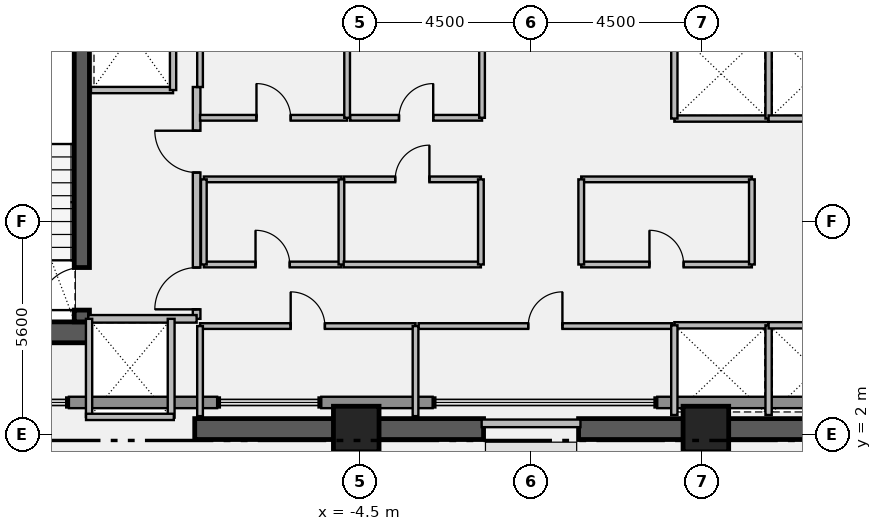
"""IFC4 building model, lengths in metres.
Left out: names, types, materials, properties, quantities, classifications, styles, units other than length and angle.
Written with IfcOpenShell. Run it as: python <this file> out.ifc"""

import sys

from ifc_helpers import new_model, si_unit, direction, frame, frame_2d, origin, origin_2d, place, context, subcontext, project, spatial, rectangle, extrude, element, fill, save


model = new_model("IFC4")
c1 = context("Model", 3, precision=1e-05, world=origin(), true_north=direction((0.0, 1.0)))
c2 = subcontext(c1, "Body", "Model", "MODEL_VIEW")
j1 = project(units=[si_unit("LENGTHUNIT", "METRE"), si_unit("PLANEANGLEUNIT", "RADIAN")], contexts=[c1])
p1 = place(None, origin())
s1 = spatial("IfcSite", under=j1, at=p1, CompositionType="ELEMENT")
p2 = place(p1, origin())
s2 = spatial("IfcBuilding", under=s1, at=p2, CompositionType="ELEMENT")
p3 = place(p2, frame((0.0, 0.0, 297.25)))
s3 = spatial("IfcBuildingStorey", under=s2, at=p3, CompositionType="ELEMENT", Elevation=297.25)
p4 = place(p3, frame((-15.96, 4.695, 0.0), z_axis=(0.0, 0.0, 1.0), x_axis=(1.0, 0.0, 0.0)))
e1 = element("IfcWall", 1, at=p4, inside=s3, PredefinedType="SHEAR", context=c2, shape_type="SweptSolid", body=[
    extrude(rectangle(XDim=4.36, YDim=0.55, at=frame_2d((2.18, 0.0))), origin(), (0.0, 0.0, 1.0), 3.61),
])
for number, where, z_axis, x_axis in (
    (2, (-8.85, 2.15, 0.0), (0.0, 0.0, 1.0), (1.0, 0.0, 0.0)),
    (3, (1.25, 2.15, 0.0), (0.0, 0.0, 1.0), (1.0, 0.0, 0.0)),
):
    element("IfcWall", number, at=place(p3, frame(where, z_axis=z_axis, x_axis=x_axis)), inside=s3, PredefinedType="SHEAR", context=c2, shape_type="SweptSolid", body=[
        extrude(rectangle(XDim=7.6, YDim=0.55, at=frame_2d((3.8, 0.0))), origin(), (0.0, 0.0, 1.0), 3.56),
    ])
p5 = place(p3, frame((-11.82, 4.97, 0.0), z_axis=(0.0, 0.0, 1.0), x_axis=(0.0, 1.0, 0.0)))
e4 = element("IfcWall", 4, at=p5, inside=s3, PredefinedType="SHEAR", context=c2, shape_type="SweptSolid", body=[
    extrude(rectangle(XDim=8.96, YDim=0.4, at=frame_2d((4.48, 0.0))), origin(), (0.0, 0.0, 1.0), 3.61),
])
p6 = place(p5, frame((0.31, 0.0, 0.0)))
e5 = element("IfcOpeningElement", 5, at=p6, cuts=e4, PredefinedType="OPENING", context=c2, shape_type="SweptSolid", body=[
    extrude(rectangle(XDim=1.12, YDim=2.22, at=frame_2d((0.56, 1.11))), frame((0.0, 0.21, 0.0), z_axis=(0.0, -1.0, 0.0), x_axis=(1.0, 0.0, 0.0)), (0.0, 0.0, 1.0), 0.42),
])
for number, where, z_axis, x_axis in (
    (6, (-4.6, 2.15, 0.0), (0.0, 0.0, 1.0), (1.0, 0.0, 0.0)),
    (7, (4.6, 2.15, 0.0), (0.0, 0.0, 1.0), (1.0, 0.0, 0.0)),
):
    element("IfcColumn", number, at=place(p3, frame(where, z_axis=z_axis, x_axis=x_axis)), inside=s3, PredefinedType="COLUMN", context=c2, shape_type="SweptSolid", body=[
        extrude(rectangle(XDim=1.2, YDim=1.2, at=origin_2d()), origin(), (0.0, 0.0, 1.0), 3.8),
    ])
p7 = place(p3, frame((9.18, 2.85, 0.0), z_axis=(0.0, 0.0, 1.0), x_axis=(-1.0, 0.0, 0.0)))
e8 = element("IfcWall", 8, at=p7, inside=s3, PredefinedType="STANDARD", context=c2, shape_type="SweptSolid", body=[
    extrude(rectangle(XDim=5.86, YDim=0.3, at=frame_2d((2.93, 0.0))), origin(), (0.0, 0.0, 1.0), 3.56),
])
p8 = place(p3, frame((-2.59, 2.85, 0.0), z_axis=(0.0, 0.0, 1.0), x_axis=(-1.0, 0.0, 0.0)))
e9 = element("IfcWall", 9, at=p8, inside=s3, PredefinedType="STANDARD", context=c2, shape_type="SweptSolid", body=[
    extrude(rectangle(XDim=2.93, YDim=0.3, at=frame_2d((1.465, 0.0))), origin(), (0.0, 0.0, 1.0), 3.56),
])
p9 = place(p3, frame((-8.26, 2.85, 0.0), z_axis=(0.0, 0.0, 1.0), x_axis=(-1.0, 0.0, 0.0)))
e10 = element("IfcWall", 10, at=p9, inside=s3, PredefinedType="STANDARD", context=c2, shape_type="SweptSolid", body=[
    extrude(rectangle(XDim=3.9, YDim=0.3, at=frame_2d((1.95, 0.0))), origin(), (0.0, 0.0, 1.0), 3.56),
])
p10 = place(p3, frame((-8.8, 5.05, 0.0), z_axis=(0.0, 0.0, 1.0), x_axis=(0.0, 1.0, 0.0)))
e11 = element("IfcWall", 11, at=p10, inside=s3, PredefinedType="PARTITIONING", context=c2, shape_type="SweptSolid", body=[
    extrude(rectangle(XDim=6.1, YDim=0.2, at=frame_2d((3.05, 0.0))), origin(), (0.0, 0.0, 1.0), 3.56),
])
p11 = place(p10, frame((0.25, 0.0, 0.0)))
e12 = element("IfcOpeningElement", 12, at=p11, cuts=e11, PredefinedType="OPENING", context=c2, shape_type="SweptSolid", body=[
    extrude(rectangle(XDim=1.1, YDim=2.2, at=frame_2d((0.55, 1.1))), frame((0.0, 0.11, 0.0), z_axis=(0.0, -1.0, 0.0), x_axis=(1.0, 0.0, 0.0)), (0.0, 0.0, 1.0), 0.22),
])
p12 = place(p10, frame((3.85, 0.0, 0.0)))
e13 = element("IfcOpeningElement", 13, at=p12, cuts=e11, PredefinedType="OPENING", context=c2, shape_type="SweptSolid", body=[
    extrude(rectangle(XDim=1.1, YDim=2.2, at=frame_2d((0.55, 1.1))), frame((0.0, 0.11, 0.0), z_axis=(0.0, -1.0, 0.0), x_axis=(1.0, 0.0, 0.0)), (0.0, 0.0, 1.0), 0.22),
])
p13 = place(p3, frame((-8.71, 4.86, 0.0), z_axis=(0.0, 0.0, 1.0), x_axis=(1.0, 0.0, 0.0)))
e14 = element("IfcWall", 14, at=p13, inside=s3, PredefinedType="PARTITIONING", context=c2, shape_type="SweptSolid", body=[
    extrude(rectangle(XDim=5.67, YDim=0.15, at=frame_2d((2.835, 0.0))), origin(), (0.0, 0.0, 1.0), 3.56),
])
p14 = place(p13, frame((2.385, 0.0, 0.0)))
e15 = element("IfcOpeningElement", 15, at=p14, cuts=e14, PredefinedType="OPENING", context=c2, shape_type="SweptSolid", body=[
    extrude(rectangle(XDim=0.9, YDim=2.15, at=frame_2d((0.45, 1.075))), frame((0.0, 0.085, 0.0), z_axis=(0.0, -1.0, 0.0), x_axis=(1.0, 0.0, 0.0)), (0.0, 0.0, 1.0), 0.17),
])
p15 = place(p3, frame((-2.96, 4.86, 0.0), z_axis=(0.0, 0.0, 1.0), x_axis=(1.0, 0.0, 0.0)))
e16 = element("IfcWall", 16, at=p15, inside=s3, PredefinedType="PARTITIONING", context=c2, shape_type="SweptSolid", body=[
    extrude(rectangle(XDim=6.67, YDim=0.15, at=frame_2d((3.335, 0.0))), origin(), (0.0, 0.0, 1.0), 3.56),
])
p16 = place(p15, frame((2.885, 0.0, 0.0)))
e17 = element("IfcOpeningElement", 17, at=p16, cuts=e16, PredefinedType="OPENING", context=c2, shape_type="SweptSolid", body=[
    extrude(rectangle(XDim=0.9, YDim=2.15, at=frame_2d((0.45, 1.075))), frame((0.0, 0.085, 0.0), z_axis=(0.0, -1.0, 0.0), x_axis=(1.0, 0.0, 0.0)), (0.0, 0.0, 1.0), 0.17),
])
p17 = place(p3, frame((-8.71, 10.34, 0.0), z_axis=(0.0, 0.0, 1.0), x_axis=(1.0, 0.0, 0.0)))
e18 = element("IfcWall", 18, at=p17, inside=s3, PredefinedType="PARTITIONING", context=c2, shape_type="SweptSolid", body=[
    extrude(rectangle(XDim=3.87, YDim=0.15, at=frame_2d((1.935, 0.0))), origin(), (0.0, 0.0, 1.0), 3.56),
])
p18 = place(p17, frame((1.485, 0.0, 0.0)))
e19 = element("IfcOpeningElement", 19, at=p18, cuts=e18, PredefinedType="OPENING", context=c2, shape_type="SweptSolid", body=[
    extrude(rectangle(XDim=0.9, YDim=2.15, at=frame_2d((0.45, 1.075))), frame((0.0, 0.085, 0.0), z_axis=(0.0, -1.0, 0.0), x_axis=(1.0, 0.0, 0.0)), (0.0, 0.0, 1.0), 0.17),
])
p19 = place(p3, frame((-4.76, 10.34, 0.0), z_axis=(0.0, 0.0, 1.0), x_axis=(1.0, 0.0, 0.0)))
e20 = element("IfcWall", 20, at=p19, inside=s3, PredefinedType="PARTITIONING", context=c2, shape_type="SweptSolid", body=[
    extrude(rectangle(XDim=3.47, YDim=0.15, at=frame_2d((1.735, 0.0))), origin(), (0.0, 0.0, 1.0), 3.56),
])
p20 = place(p19, frame((1.285, 0.0, 0.0)))
e21 = element("IfcOpeningElement", 21, at=p20, cuts=e20, PredefinedType="OPENING", context=c2, shape_type="SweptSolid", body=[
    extrude(rectangle(XDim=0.9, YDim=2.15, at=frame_2d((0.45, 1.075))), frame((0.0, 0.085, 0.0), z_axis=(0.0, -1.0, 0.0), x_axis=(1.0, 0.0, 0.0)), (0.0, 0.0, 1.0), 0.17),
])
p21 = place(p3, frame((-8.61, 6.48, 0.0), z_axis=(0.0, 0.0, 1.0), x_axis=(1.0, 0.0, 0.0)))
e22 = element("IfcWall", 22, at=p21, inside=s3, PredefinedType="PARTITIONING", context=c2, shape_type="SweptSolid", body=[
    extrude(rectangle(XDim=3.62, YDim=0.15, at=frame_2d((1.81, 0.0))), origin(), (0.0, 0.0, 1.0), 3.56),
])
p22 = place(p21, frame((1.36, 0.0, 0.0)))
e23 = element("IfcOpeningElement", 23, at=p22, cuts=e22, PredefinedType="OPENING", context=c2, shape_type="SweptSolid", body=[
    extrude(rectangle(XDim=0.9, YDim=2.15, at=frame_2d((0.45, 1.075))), frame((0.0, 0.085, 0.0), z_axis=(0.0, -1.0, 0.0), x_axis=(1.0, 0.0, 0.0)), (0.0, 0.0, 1.0), 0.17),
])
p23 = place(p3, frame((-4.93, 8.72, 0.0), z_axis=(0.0, 0.0, 1.0), x_axis=(1.0, 0.0, 0.0)))
e24 = element("IfcWall", 24, at=p23, inside=s3, PredefinedType="PARTITIONING", context=c2, shape_type="SweptSolid", body=[
    extrude(rectangle(XDim=3.61, YDim=0.15, at=frame_2d((1.805, 0.0))), origin(), (0.0, 0.0, 1.0), 3.56),
])
p24 = place(p23, frame((1.355, 0.0, 0.0)))
e25 = element("IfcOpeningElement", 25, at=p24, cuts=e24, PredefinedType="OPENING", context=c2, shape_type="SweptSolid", body=[
    extrude(rectangle(XDim=0.9, YDim=2.15, at=frame_2d((0.45, 1.075))), frame((0.0, 0.085, 0.0), z_axis=(0.0, -1.0, 0.0), x_axis=(1.0, 0.0, 0.0)), (0.0, 0.0, 1.0), 0.17),
])
p25 = place(p3, frame((1.32, 6.48, 0.0), z_axis=(0.0, 0.0, 1.0), x_axis=(1.0, 0.0, 0.0)))
e26 = element("IfcWall", 26, at=p25, inside=s3, PredefinedType="PARTITIONING", context=c2, shape_type="SweptSolid", body=[
    extrude(rectangle(XDim=4.49, YDim=0.15, at=frame_2d((2.245, 0.0))), origin(), (0.0, 0.0, 1.0), 3.56),
])
p26 = place(p25, frame((1.795, 0.0, 0.0)))
e27 = element("IfcOpeningElement", 27, at=p26, cuts=e26, PredefinedType="OPENING", context=c2, shape_type="SweptSolid", body=[
    extrude(rectangle(XDim=0.9, YDim=2.15, at=frame_2d((0.45, 1.075))), frame((0.0, 0.085, 0.0), z_axis=(0.0, -1.0, 0.0), x_axis=(1.0, 0.0, 0.0)), (0.0, 0.0, 1.0), 0.17),
])
p27 = place(p3, frame((-11.65, 5.05, 0.0), z_axis=(0.0, 0.0, 1.0), x_axis=(1.0, 0.0, 0.0)))
e28 = element("IfcWall", 28, at=p27, inside=s3, PredefinedType="PARTITIONING", context=c2, shape_type="SweptSolid", body=[
    extrude(rectangle(XDim=2.85, YDim=0.2, at=frame_2d((1.425, 0.0))), origin(), (0.0, 0.0, 1.0), 3.56),
])
p28 = place(p3, frame((-11.58, 11.07, 0.0), z_axis=(0.0, 0.0, 1.0), x_axis=(1.0, 0.0, 0.0)))
e29 = element("IfcWall", 29, at=p28, inside=s3, PredefinedType="PARTITIONING", context=c2, shape_type="SweptSolid", body=[
    extrude(rectangle(XDim=2.16, YDim=0.165, at=frame_2d((1.08, 0.0))), origin(), (0.0, 0.0, 1.0), 3.56),
])
p29 = place(p3, frame((-9.42, 11.07, 0.0), z_axis=(0.0, 0.0, 1.0), x_axis=(0.0, 1.0, 0.0)))
e30 = element("IfcWall", 30, at=p29, inside=s3, PredefinedType="PARTITIONING", context=c2, shape_type="SweptSolid", body=[
    extrude(rectangle(XDim=2.96, YDim=0.165, at=frame_2d((1.48, 0.0))), origin(), (0.0, 0.0, 1.0), 3.56),
])
p30 = place(p3, frame((3.77, 4.88, 0.0), z_axis=(0.0, 0.0, 1.0), x_axis=(1.0, 0.0, 0.0)))
e31 = element("IfcWall", 31, at=p30, inside=s3, PredefinedType="PARTITIONING", context=c2, shape_type="SweptSolid", body=[
    extrude(rectangle(XDim=2.48, YDim=0.165, at=frame_2d((1.24, 0.0))), origin(), (0.0, 0.0, 1.0), 3.56),
])
for number, where, z_axis, x_axis in (
    (32, (3.77, 2.52, 0.0), (0.0, 0.0, 1.0), (0.0, 1.0, 0.0)),
    (33, (6.25, 2.52, 0.0), (0.0, 0.0, 1.0), (0.0, 1.0, 0.0)),
):
    element("IfcWall", number, at=place(p3, frame(where, z_axis=z_axis, x_axis=x_axis)), inside=s3, PredefinedType="PARTITIONING", context=c2, shape_type="SweptSolid", body=[
        extrude(rectangle(XDim=2.36, YDim=0.165, at=frame_2d((1.18, 0.0))), origin(), (0.0, 0.0, 1.0), 3.56),
    ])
for number, where, z_axis, x_axis in (
    (34, (6.25, 4.88, 0.0), (0.0, 0.0, 1.0), (1.0, 0.0, 0.0)),
    (35, (3.77, 10.32, 0.0), (0.0, 0.0, 1.0), (1.0, 0.0, 0.0)),
):
    element("IfcWall", number, at=place(p3, frame(where, z_axis=z_axis, x_axis=x_axis)), inside=s3, PredefinedType="PARTITIONING", context=c2, shape_type="SweptSolid", body=[
        extrude(rectangle(XDim=2.48, YDim=0.165, at=frame_2d((1.24, 0.0))), origin(), (0.0, 0.0, 1.0), 3.56),
    ])
for number, where, z_axis, x_axis in (
    (36, (3.77, 10.32, 0.0), (0.0, 0.0, 1.0), (0.0, 1.0, 0.0)),
    (37, (6.25, 10.32, 0.0), (0.0, 0.0, 1.0), (0.0, 1.0, 0.0)),
):
    element("IfcWall", number, at=place(p3, frame(where, z_axis=z_axis, x_axis=x_axis)), inside=s3, PredefinedType="PARTITIONING", context=c2, shape_type="SweptSolid", body=[
        extrude(rectangle(XDim=2.36, YDim=0.165, at=frame_2d((1.18, 0.0))), origin(), (0.0, 0.0, 1.0), 3.56),
    ])
p31 = place(p3, frame((6.25, 10.32, 0.0), z_axis=(0.0, 0.0, 1.0), x_axis=(1.0, 0.0, 0.0)))
e38 = element("IfcWall", 38, at=p31, inside=s3, PredefinedType="PARTITIONING", context=c2, shape_type="SweptSolid", body=[
    extrude(rectangle(XDim=2.48, YDim=0.165, at=frame_2d((1.24, 0.0))), origin(), (0.0, 0.0, 1.0), 3.56),
])
p32 = place(p3, frame((-1.3, 2.3, 0.0), z_axis=(0.0, 0.0, 1.0), x_axis=(1.0, 0.0, 0.0)))
e39 = element("IfcWall", 39, at=p32, inside=s3, PredefinedType="PARTITIONING", context=c2, shape_type="SweptSolid", body=[
    extrude(rectangle(XDim=2.6, YDim=0.2, at=frame_2d((1.3, 0.0))), origin(), (0.0, 0.0, 1.0), 2.46),
])
for number, where, z_axis, x_axis in (
    (40, (-8.71, 2.49, 0.0), (0.0, 0.0, 1.0), (0.0, 1.0, 0.0)),
    (41, (-3.04, 2.49, 0.0), (0.0, 0.0, 1.0), (0.0, 1.0, 0.0)),
):
    element("IfcWall", number, at=place(p3, frame(where, z_axis=z_axis, x_axis=x_axis)), inside=s3, PredefinedType="PARTITIONING", context=c2, shape_type="SweptSolid", body=[
        extrude(rectangle(XDim=2.37, YDim=0.15, at=frame_2d((1.185, 0.0))), origin(), (0.0, 0.0, 1.0), 3.56),
    ])
p33 = place(p3, frame((-8.71, 11.15, 0.0), z_axis=(0.0, 0.0, 1.0), x_axis=(0.0, 1.0, 0.0)))
e42 = element("IfcWall", 42, at=p33, inside=s3, PredefinedType="PARTITIONING", context=c2, shape_type="SweptSolid", body=[
    extrude(rectangle(XDim=1.71, YDim=0.15, at=frame_2d((0.855, 0.0))), origin(), (0.0, 0.0, 1.0), 3.56),
])
for number, where, z_axis, x_axis in (
    (43, (-4.84, 10.34, 0.0), (0.0, 0.0, 1.0), (0.0, 1.0, 0.0)),
    (44, (-1.29, 10.34, 0.0), (0.0, 0.0, 1.0), (0.0, 1.0, 0.0)),
):
    element("IfcWall", number, at=place(p3, frame(where, z_axis=z_axis, x_axis=x_axis)), inside=s3, PredefinedType="PARTITIONING", context=c2, shape_type="SweptSolid", body=[
        extrude(rectangle(XDim=2.52, YDim=0.15, at=frame_2d((1.26, 0.0))), origin(), (0.0, 0.0, 1.0), 3.56),
    ])
p34 = place(p3, frame((-9.47, 2.45, 0.0), z_axis=(0.0, 0.0, 1.0), x_axis=(0.0, 1.0, 0.0)))
e45 = element("IfcWall", 45, at=p34, inside=s3, PredefinedType="PARTITIONING", context=c2, shape_type="SweptSolid", body=[
    extrude(rectangle(XDim=2.6, YDim=0.18, at=frame_2d((1.3, 0.0))), origin(), (0.0, 0.0, 1.0), 3.56),
])
p35 = place(p3, frame((-11.63, 2.47, 0.0), z_axis=(0.0, 0.0, 1.0), x_axis=(0.0, 1.0, 0.0)))
e46 = element("IfcWall", 46, at=p35, inside=s3, PredefinedType="PARTITIONING", context=c2, shape_type="SweptSolid", body=[
    extrude(rectangle(XDim=2.58, YDim=0.165, at=frame_2d((1.29, 0.0))), origin(), (0.0, 0.0, 1.0), 3.56),
])
p36 = place(p3, frame((-11.71, 2.47, 0.0), z_axis=(0.0, 0.0, 1.0), x_axis=(1.0, 0.0, 0.0)))
e47 = element("IfcWall", 47, at=p36, inside=s3, PredefinedType="PARTITIONING", context=c2, shape_type="SweptSolid", body=[
    extrude(rectangle(XDim=2.31, YDim=0.165, at=frame_2d((1.155, 0.0))), origin(), (0.0, 0.0, 1.0), 2.46),
])
p37 = place(p3, frame((-8.61, 8.72, 0.0), z_axis=(0.0, 0.0, 1.0), x_axis=(1.0, 0.0, 0.0)))
e48 = element("IfcWall", 48, at=p37, inside=s3, PredefinedType="PARTITIONING", context=c2, shape_type="SweptSolid", body=[
    extrude(rectangle(XDim=3.62, YDim=0.15, at=frame_2d((1.81, 0.0))), origin(), (0.0, 0.0, 1.0), 3.56),
])
for number, where, z_axis, x_axis in (
    (49, (-8.61, 6.48, 0.0), (0.0, 0.0, 1.0), (0.0, 1.0, 0.0)),
    (50, (-4.99, 6.48, 0.0), (0.0, 0.0, 1.0), (0.0, 1.0, 0.0)),
):
    element("IfcWall", number, at=place(p3, frame(where, z_axis=z_axis, x_axis=x_axis)), inside=s3, PredefinedType="PARTITIONING", context=c2, shape_type="SweptSolid", body=[
        extrude(rectangle(XDim=2.24, YDim=0.15, at=frame_2d((1.12, 0.0))), origin(), (0.0, 0.0, 1.0), 3.56),
    ])
p38 = place(p3, frame((-4.93, 6.48, 0.0), z_axis=(0.0, 0.0, 1.0), x_axis=(1.0, 0.0, 0.0)))
e51 = element("IfcWall", 51, at=p38, inside=s3, PredefinedType="PARTITIONING", context=c2, shape_type="SweptSolid", body=[
    extrude(rectangle(XDim=3.61, YDim=0.15, at=frame_2d((1.805, 0.0))), origin(), (0.0, 0.0, 1.0), 3.56),
])
p39 = place(p3, frame((-1.32, 6.48, 0.0), z_axis=(0.0, 0.0, 1.0), x_axis=(0.0, 1.0, 0.0)))
e52 = element("IfcWall", 52, at=p39, inside=s3, PredefinedType="PARTITIONING", context=c2, shape_type="SweptSolid", body=[
    extrude(rectangle(XDim=2.24, YDim=0.15, at=frame_2d((1.12, 0.0))), origin(), (0.0, 0.0, 1.0), 3.56),
])
p40 = place(p3, frame((1.32, 8.72, 0.0), z_axis=(0.0, 0.0, 1.0), x_axis=(1.0, 0.0, 0.0)))
e53 = element("IfcWall", 53, at=p40, inside=s3, PredefinedType="PARTITIONING", context=c2, shape_type="SweptSolid", body=[
    extrude(rectangle(XDim=4.49, YDim=0.15, at=frame_2d((2.245, 0.0))), origin(), (0.0, 0.0, 1.0), 3.56),
])
for number, where, z_axis, x_axis in (
    (54, (1.32, 6.48, 0.0), (0.0, 0.0, 1.0), (0.0, 1.0, 0.0)),
    (55, (5.81, 6.48, 0.0), (0.0, 0.0, 1.0), (0.0, 1.0, 0.0)),
):
    element("IfcWall", number, at=place(p3, frame(where, z_axis=z_axis, x_axis=x_axis)), inside=s3, PredefinedType="PARTITIONING", context=c2, shape_type="SweptSolid", body=[
        extrude(rectangle(XDim=2.24, YDim=0.15, at=frame_2d((1.12, 0.0))), origin(), (0.0, 0.0, 1.0), 3.56),
    ])
p41 = place(p6, origin())
e56 = element("IfcDoor", 56, at=p41, inside=s3, OperationType="SINGLE_SWING_LEFT", PredefinedType="DOOR", context=c2, shape_type="SweptSolid", body=[
    extrude(rectangle(XDim=1.12, YDim=2.22, at=frame_2d((0.56, 1.11))), frame((0.0, 0.025, 0.0), z_axis=(0.0, -1.0, 0.0), x_axis=(1.0, 0.0, 0.0)), (0.0, 0.0, 1.0), 0.05),
])
fill(e5, e56)
p42 = place(p11, origin())
e57 = element("IfcDoor", 57, at=p42, inside=s3, OperationType="SINGLE_SWING_LEFT", PredefinedType="DOOR", context=c2, shape_type="SweptSolid", body=[
    extrude(rectangle(XDim=1.1, YDim=2.2, at=frame_2d((0.55, 1.1))), frame((0.0, 0.025, 0.0), z_axis=(0.0, -1.0, 0.0), x_axis=(1.0, 0.0, 0.0)), (0.0, 0.0, 1.0), 0.05),
])
fill(e12, e57)
p43 = place(p12, origin())
e58 = element("IfcDoor", 58, at=p43, inside=s3, OperationType="SINGLE_SWING_RIGHT", PredefinedType="DOOR", context=c2, shape_type="SweptSolid", body=[
    extrude(rectangle(XDim=1.1, YDim=2.2, at=frame_2d((0.55, 1.1))), frame((0.0, 0.025, 0.0), z_axis=(0.0, -1.0, 0.0), x_axis=(1.0, 0.0, 0.0)), (0.0, 0.0, 1.0), 0.05),
])
fill(e13, e58)
p44 = place(p14, origin())
e59 = element("IfcDoor", 59, at=p44, inside=s3, OperationType="SINGLE_SWING_LEFT", PredefinedType="DOOR", context=c2, shape_type="SweptSolid", body=[
    extrude(rectangle(XDim=0.9, YDim=2.15, at=frame_2d((0.45, 1.075))), frame((0.0, 0.025, 0.0), z_axis=(0.0, -1.0, 0.0), x_axis=(1.0, 0.0, 0.0)), (0.0, 0.0, 1.0), 0.05),
])
fill(e15, e59)
p45 = place(p16, origin())
e60 = element("IfcDoor", 60, at=p45, inside=s3, OperationType="SINGLE_SWING_RIGHT", PredefinedType="DOOR", context=c2, shape_type="SweptSolid", body=[
    extrude(rectangle(XDim=0.9, YDim=2.15, at=frame_2d((0.45, 1.075))), frame((0.0, 0.025, 0.0), z_axis=(0.0, -1.0, 0.0), x_axis=(1.0, 0.0, 0.0)), (0.0, 0.0, 1.0), 0.05),
])
fill(e17, e60)
p46 = place(p18, origin())
e61 = element("IfcDoor", 61, at=p46, inside=s3, OperationType="SINGLE_SWING_LEFT", PredefinedType="DOOR", context=c2, shape_type="SweptSolid", body=[
    extrude(rectangle(XDim=0.9, YDim=2.15, at=frame_2d((0.45, 1.075))), frame((0.0, 0.025, 0.0), z_axis=(0.0, -1.0, 0.0), x_axis=(1.0, 0.0, 0.0)), (0.0, 0.0, 1.0), 0.05),
])
fill(e19, e61)
p47 = place(p20, origin())
e62 = element("IfcDoor", 62, at=p47, inside=s3, OperationType="SINGLE_SWING_RIGHT", PredefinedType="DOOR", context=c2, shape_type="SweptSolid", body=[
    extrude(rectangle(XDim=0.9, YDim=2.15, at=frame_2d((0.45, 1.075))), frame((0.0, 0.025, 0.0), z_axis=(0.0, -1.0, 0.0), x_axis=(1.0, 0.0, 0.0)), (0.0, 0.0, 1.0), 0.05),
])
fill(e21, e62)
p48 = place(p22, origin())
e63 = element("IfcDoor", 63, at=p48, inside=s3, OperationType="SINGLE_SWING_LEFT", PredefinedType="DOOR", context=c2, shape_type="SweptSolid", body=[
    extrude(rectangle(XDim=0.9, YDim=2.15, at=frame_2d((0.45, 1.075))), frame((0.0, 0.025, 0.0), z_axis=(0.0, -1.0, 0.0), x_axis=(1.0, 0.0, 0.0)), (0.0, 0.0, 1.0), 0.05),
])
fill(e23, e63)
p49 = place(p24, origin())
e64 = element("IfcDoor", 64, at=p49, inside=s3, OperationType="SINGLE_SWING_RIGHT", PredefinedType="DOOR", context=c2, shape_type="SweptSolid", body=[
    extrude(rectangle(XDim=0.9, YDim=2.15, at=frame_2d((0.45, 1.075))), frame((0.0, 0.025, 0.0), z_axis=(0.0, -1.0, 0.0), x_axis=(1.0, 0.0, 0.0)), (0.0, 0.0, 1.0), 0.05),
])
fill(e25, e64)
p50 = place(p26, origin())
e65 = element("IfcDoor", 65, at=p50, inside=s3, OperationType="SINGLE_SWING_LEFT", PredefinedType="DOOR", context=c2, shape_type="SweptSolid", body=[
    extrude(rectangle(XDim=0.9, YDim=2.15, at=frame_2d((0.45, 1.075))), frame((0.0, 0.025, 0.0), z_axis=(0.0, -1.0, 0.0), x_axis=(1.0, 0.0, 0.0)), (0.0, 0.0, 1.0), 0.05),
])
fill(e27, e65)
save(model, sys.argv[1])
